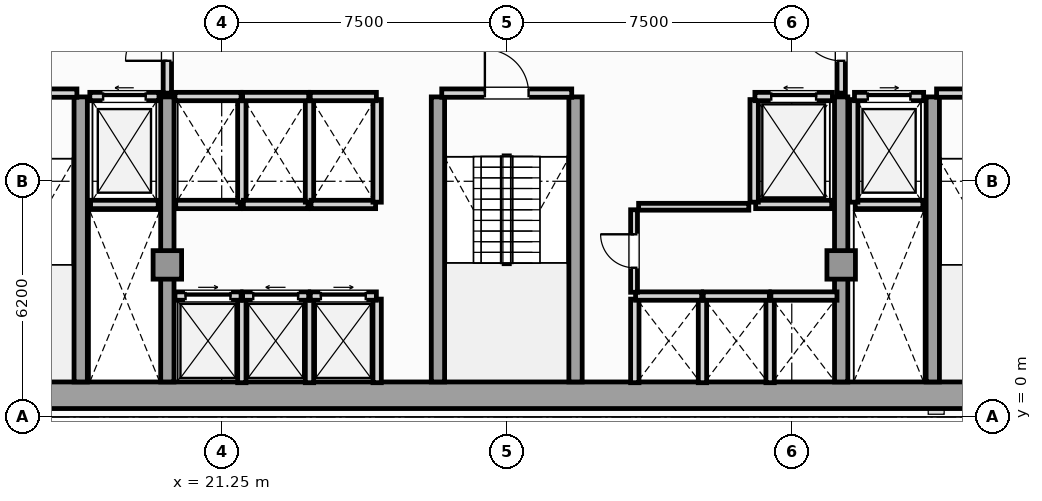
"""IFC4 building model, lengths in metres.
Left out: names, types, materials, properties, quantities, classifications, styles, units other than length and angle.
Written with IfcOpenShell. Run it as: python <this file> out.ifc"""

import sys

from ifc_helpers import new_model, si_unit, direction, frame, frame_2d, origin, origin_2d, place, context, subcontext, project, spatial, rectangle, extrude, element, fill, save


model = new_model("IFC4")
c1 = context("Model", 3, precision=1e-05, world=origin(), true_north=direction((0.0, 1.0)))
c2 = subcontext(c1, "Body", "Model", "MODEL_VIEW")
j1 = project(units=[si_unit("LENGTHUNIT", "METRE"), si_unit("PLANEANGLEUNIT", "RADIAN")], contexts=[c1])
p1 = place(None, origin())
s1 = spatial("IfcSite", under=j1, at=p1, CompositionType="ELEMENT")
p2 = place(p1, origin())
s2 = spatial("IfcBuilding", under=s1, at=p2, CompositionType="ELEMENT")
p3 = place(p2, frame((0.0, 0.0, 111.85)))
s3 = spatial("IfcBuildingStorey", under=s2, at=p3, CompositionType="ELEMENT", Elevation=111.85)
p4 = place(p3, frame((13.25, 0.57, 0.0), z_axis=(0.0, 0.0, 1.0), x_axis=(1.0, 0.0, 0.0)))
e1 = element("IfcWall", 1, at=p4, inside=s3, PredefinedType="SHEAR", context=c2, shape_type="SweptSolid", body=[
    extrude(rectangle(XDim=31.0, YDim=0.7, at=frame_2d((15.5, 0.0))), origin(), (0.0, 0.0, 1.0), 3.6),
])
for number, where, z_axis, x_axis in (
    (2, (17.54, 0.92, 0.0), (0.0, 0.0, 1.0), (0.0, 1.0, 0.0)),
    (3, (19.82, 0.92, 0.0), (0.0, 0.0, 1.0), (0.0, 1.0, 0.0)),
    (4, (26.94, 0.92, 0.0), (0.0, 0.0, 1.0), (0.0, 1.0, 0.0)),
    (5, (30.56, 0.92, 0.0), (0.0, 0.0, 1.0), (0.0, 1.0, 0.0)),
    (6, (37.55, 0.92, 0.0), (0.0, 0.0, 1.0), (0.0, 1.0, 0.0)),
    (7, (39.96, 0.92, 0.0), (0.0, 0.0, 1.0), (0.0, 1.0, 0.0)),
):
    element("IfcWall", number, at=place(p3, frame(where, z_axis=z_axis, x_axis=x_axis)), inside=s3, PredefinedType="SHEAR", context=c2, shape_type="SweptSolid", body=[
        extrude(rectangle(XDim=7.5, YDim=0.35, at=frame_2d((3.75, 0.0))), origin(), (0.0, 0.0, 1.0), 3.6),
    ])
for number, where, z_axis, x_axis in (
    (8, (19.82, 4.0, 0.0), (0.0, 0.0, 1.0), (1.0, 0.0, 0.0)),
    (9, (37.55, 4.0, 0.0), (0.0, 0.0, 1.0), (1.0, 0.0, 0.0)),
):
    element("IfcColumn", number, at=place(p3, frame(where, z_axis=z_axis, x_axis=x_axis)), inside=s3, PredefinedType="COLUMN", context=c2, shape_type="SweptSolid", body=[
        extrude(rectangle(XDim=0.75, YDim=0.75, at=origin_2d()), origin(), (0.0, 0.0, 1.0), 3.85),
    ])
p5 = place(p3, frame((17.8, 5.59, 0.0), z_axis=(0.0, 0.0, 1.0), x_axis=(1.0, 0.0, 0.0)))
e10 = element("IfcWall", 10, at=p5, inside=s3, PredefinedType="SOLIDWALL", context=c2, shape_type="SweptSolid", body=[
    extrude(rectangle(XDim=1.78, YDim=0.22, at=frame_2d((0.89, 0.0))), origin(), (0.0, 0.0, 1.0), 3.6),
])
p6 = place(p3, frame((17.78, 8.43, 0.0), z_axis=(0.0, 0.0, 1.0), x_axis=(1.0, 0.0, 0.0)))
e11 = element("IfcWall", 11, at=p6, inside=s3, PredefinedType="SOLIDWALL", context=c2, shape_type="SweptSolid", body=[
    extrude(rectangle(XDim=1.82, YDim=0.22, at=frame_2d((0.91, 0.0))), origin(), (0.0, 0.0, 1.0), 3.6),
])
p7 = place(p6, frame((0.35, 0.0, 0.0)))
e12 = element("IfcOpeningElement", 12, at=p7, cuts=e11, PredefinedType="OPENING", context=c2, shape_type="SweptSolid", body=[
    extrude(rectangle(XDim=1.12, YDim=2.25, at=frame_2d((0.56, 1.125))), frame((0.0, 0.12, 0.0), z_axis=(0.0, -1.0, 0.0), x_axis=(1.0, 0.0, 0.0)), (0.0, 0.0, 1.0), 0.24),
])
p8 = place(p3, frame((37.92, 5.59, 0.0), z_axis=(0.0, 0.0, 1.0), x_axis=(1.0, 0.0, 0.0)))
e13 = element("IfcWall", 13, at=p8, inside=s3, PredefinedType="SOLIDWALL", context=c2, shape_type="SweptSolid", body=[
    extrude(rectangle(XDim=1.78, YDim=0.22, at=frame_2d((0.89, 0.0))), origin(), (0.0, 0.0, 1.0), 3.6),
])
p9 = place(p3, frame((37.88, 5.65, 0.0), z_axis=(0.0, 0.0, 1.0), x_axis=(0.0, 1.0, 0.0)))
e14 = element("IfcWall", 14, at=p9, inside=s3, PredefinedType="SOLIDWALL", context=c2, shape_type="SweptSolid", body=[
    extrude(rectangle(XDim=2.7, YDim=0.22, at=frame_2d((1.35, 0.0))), origin(), (0.0, 0.0, 1.0), 3.6),
])
p10 = place(p3, frame((37.9, 8.43, 0.0), z_axis=(0.0, 0.0, 1.0), x_axis=(1.0, 0.0, 0.0)))
e15 = element("IfcWall", 15, at=p10, inside=s3, PredefinedType="SOLIDWALL", context=c2, shape_type="SweptSolid", body=[
    extrude(rectangle(XDim=1.82, YDim=0.22, at=frame_2d((0.91, 0.0))), origin(), (0.0, 0.0, 1.0), 3.6),
])
p11 = place(p10, frame((0.35, 0.0, 0.0)))
e16 = element("IfcOpeningElement", 16, at=p11, cuts=e15, PredefinedType="OPENING", context=c2, shape_type="SweptSolid", body=[
    extrude(rectangle(XDim=1.12, YDim=2.25, at=frame_2d((0.56, 1.125))), frame((0.0, 0.12, 0.0), z_axis=(0.0, -1.0, 0.0), x_axis=(1.0, 0.0, 0.0)), (0.0, 0.0, 1.0), 0.24),
])
p12 = place(p3, frame((35.3, 5.59, 0.0), z_axis=(0.0, 0.0, 1.0), x_axis=(1.0, 0.0, 0.0)))
e17 = element("IfcWall", 17, at=p12, inside=s3, PredefinedType="SOLIDWALL", context=c2, shape_type="SweptSolid", body=[
    extrude(rectangle(XDim=2.0, YDim=0.22, at=frame_2d((1.0, 0.0))), origin(), (0.0, 0.0, 1.0), 3.6),
])
p13 = place(p3, frame((35.26, 5.65, 0.0), z_axis=(0.0, 0.0, 1.0), x_axis=(0.0, 1.0, 0.0)))
e18 = element("IfcWall", 18, at=p13, inside=s3, PredefinedType="SOLIDWALL", context=c2, shape_type="SweptSolid", body=[
    extrude(rectangle(XDim=2.7, YDim=0.22, at=frame_2d((1.35, 0.0))), origin(), (0.0, 0.0, 1.0), 3.6),
])
p14 = place(p3, frame((35.28, 8.43, 0.0), z_axis=(0.0, 0.0, 1.0), x_axis=(1.0, 0.0, 0.0)))
e19 = element("IfcWall", 19, at=p14, inside=s3, PredefinedType="SOLIDWALL", context=c2, shape_type="SweptSolid", body=[
    extrude(rectangle(XDim=2.04, YDim=0.22, at=frame_2d((1.02, 0.0))), origin(), (0.0, 0.0, 1.0), 3.6),
])
p15 = place(p14, frame((0.43, 0.0, 0.0)))
e20 = element("IfcOpeningElement", 20, at=p15, cuts=e19, PredefinedType="OPENING", context=c2, shape_type="SweptSolid", body=[
    extrude(rectangle(XDim=1.18, YDim=2.2, at=frame_2d((0.59, 1.1))), frame((0.0, 0.12, 0.0), z_axis=(0.0, -1.0, 0.0), x_axis=(1.0, 0.0, 0.0)), (0.0, 0.0, 1.0), 0.24),
])
p16 = place(p3, frame((21.78, 0.9, 0.0), z_axis=(0.0, 0.0, 1.0), x_axis=(0.0, 1.0, 0.0)))
e21 = element("IfcWall", 21, at=p16, inside=s3, PredefinedType="SOLIDWALL", context=c2, shape_type="SweptSolid", body=[
    extrude(rectangle(XDim=2.2, YDim=0.22, at=frame_2d((1.1, 0.0))), origin(), (0.0, 0.0, 1.0), 3.6),
])
p17 = place(p3, frame((20.02, 3.18, 0.0), z_axis=(0.0, 0.0, 1.0), x_axis=(1.0, 0.0, 0.0)))
e22 = element("IfcWall", 22, at=p17, inside=s3, PredefinedType="SOLIDWALL", context=c2, shape_type="SweptSolid", body=[
    extrude(rectangle(XDim=1.74, YDim=0.22, at=frame_2d((0.87, 0.0))), origin(), (0.0, 0.0, 1.0), 3.6),
])
p18 = place(p17, frame((0.28, 0.0, 0.0)))
e23 = element("IfcOpeningElement", 23, at=p18, cuts=e22, PredefinedType="OPENING", context=c2, shape_type="SweptSolid", body=[
    extrude(rectangle(XDim=1.18, YDim=2.2, at=frame_2d((0.59, 1.1))), frame((0.0, 0.12, 0.0), z_axis=(0.0, -1.0, 0.0), x_axis=(1.0, 0.0, 0.0)), (0.0, 0.0, 1.0), 0.24),
])
p19 = place(p3, frame((23.56, 0.9, 0.0), z_axis=(0.0, 0.0, 1.0), x_axis=(0.0, 1.0, 0.0)))
e24 = element("IfcWall", 24, at=p19, inside=s3, PredefinedType="SOLIDWALL", context=c2, shape_type="SweptSolid", body=[
    extrude(rectangle(XDim=2.2, YDim=0.22, at=frame_2d((1.1, 0.0))), origin(), (0.0, 0.0, 1.0), 3.6),
])
p20 = place(p3, frame((21.8, 3.18, 0.0), z_axis=(0.0, 0.0, 1.0), x_axis=(1.0, 0.0, 0.0)))
e25 = element("IfcWall", 25, at=p20, inside=s3, PredefinedType="SOLIDWALL", context=c2, shape_type="SweptSolid", body=[
    extrude(rectangle(XDim=1.74, YDim=0.22, at=frame_2d((0.87, 0.0))), origin(), (0.0, 0.0, 1.0), 3.6),
])
p21 = place(p20, frame((0.28, 0.0, 0.0)))
e26 = element("IfcOpeningElement", 26, at=p21, cuts=e25, PredefinedType="OPENING", context=c2, shape_type="SweptSolid", body=[
    extrude(rectangle(XDim=1.18, YDim=2.2, at=frame_2d((0.59, 1.1))), frame((0.0, 0.12, 0.0), z_axis=(0.0, -1.0, 0.0), x_axis=(1.0, 0.0, 0.0)), (0.0, 0.0, 1.0), 0.24),
])
p22 = place(p3, frame((25.34, 0.9, 0.0), z_axis=(0.0, 0.0, 1.0), x_axis=(0.0, 1.0, 0.0)))
e27 = element("IfcWall", 27, at=p22, inside=s3, PredefinedType="SOLIDWALL", context=c2, shape_type="SweptSolid", body=[
    extrude(rectangle(XDim=2.2, YDim=0.22, at=frame_2d((1.1, 0.0))), origin(), (0.0, 0.0, 1.0), 3.6),
])
p23 = place(p3, frame((23.58, 3.18, 0.0), z_axis=(0.0, 0.0, 1.0), x_axis=(1.0, 0.0, 0.0)))
e28 = element("IfcWall", 28, at=p23, inside=s3, PredefinedType="SOLIDWALL", context=c2, shape_type="SweptSolid", body=[
    extrude(rectangle(XDim=1.74, YDim=0.22, at=frame_2d((0.87, 0.0))), origin(), (0.0, 0.0, 1.0), 3.6),
])
p24 = place(p23, frame((0.28, 0.0, 0.0)))
e29 = element("IfcOpeningElement", 29, at=p24, cuts=e28, PredefinedType="OPENING", context=c2, shape_type="SweptSolid", body=[
    extrude(rectangle(XDim=1.18, YDim=2.2, at=frame_2d((0.59, 1.1))), frame((0.0, 0.12, 0.0), z_axis=(0.0, -1.0, 0.0), x_axis=(1.0, 0.0, 0.0)), (0.0, 0.0, 1.0), 0.24),
])
for number, where, z_axis, x_axis in (
    (30, (32.12, 0.9, 0.0), (0.0, 0.0, 1.0), (0.0, 1.0, 0.0)),
    (31, (33.9, 0.9, 0.0), (0.0, 0.0, 1.0), (0.0, 1.0, 0.0)),
):
    element("IfcWall", number, at=place(p3, frame(where, z_axis=z_axis, x_axis=x_axis)), inside=s3, PredefinedType="SOLIDWALL", context=c2, shape_type="SweptSolid", body=[
        extrude(rectangle(XDim=2.2, YDim=0.22, at=frame_2d((1.1, 0.0))), origin(), (0.0, 0.0, 1.0), 3.6),
    ])
p25 = place(p3, frame((32.14, 3.18, 0.0), z_axis=(0.0, 0.0, 1.0), x_axis=(1.0, 0.0, 0.0)))
e32 = element("IfcWall", 32, at=p25, inside=s3, PredefinedType="SOLIDWALL", context=c2, shape_type="SweptSolid", body=[
    extrude(rectangle(XDim=1.74, YDim=0.22, at=frame_2d((0.87, 0.0))), origin(), (0.0, 0.0, 1.0), 3.6),
])
p26 = place(p3, frame((35.68, 0.9, 0.0), z_axis=(0.0, 0.0, 1.0), x_axis=(0.0, 1.0, 0.0)))
e33 = element("IfcWall", 33, at=p26, inside=s3, PredefinedType="SOLIDWALL", context=c2, shape_type="SweptSolid", body=[
    extrude(rectangle(XDim=2.2, YDim=0.22, at=frame_2d((1.1, 0.0))), origin(), (0.0, 0.0, 1.0), 3.6),
])
for number, where, z_axis, x_axis in (
    (34, (33.92, 3.18, 0.0), (0.0, 0.0, 1.0), (1.0, 0.0, 0.0)),
    (35, (35.7, 3.18, 0.0), (0.0, 0.0, 1.0), (1.0, 0.0, 0.0)),
):
    element("IfcWall", number, at=place(p3, frame(where, z_axis=z_axis, x_axis=x_axis)), inside=s3, PredefinedType="SOLIDWALL", context=c2, shape_type="SweptSolid", body=[
        extrude(rectangle(XDim=1.74, YDim=0.22, at=frame_2d((0.87, 0.0))), origin(), (0.0, 0.0, 1.0), 3.6),
    ])
p27 = place(p3, frame((20.04, 5.59, 0.0), z_axis=(0.0, 0.0, 1.0), x_axis=(1.0, 0.0, 0.0)))
e36 = element("IfcWall", 36, at=p27, inside=s3, PredefinedType="SOLIDWALL", context=c2, shape_type="SweptSolid", body=[
    extrude(rectangle(XDim=1.7, YDim=0.22, at=frame_2d((0.85, 0.0))), origin(), (0.0, 0.0, 1.0), 3.6),
])
p28 = place(p3, frame((21.78, 5.65, 0.0), z_axis=(0.0, 0.0, 1.0), x_axis=(0.0, 1.0, 0.0)))
e37 = element("IfcWall", 37, at=p28, inside=s3, PredefinedType="SOLIDWALL", context=c2, shape_type="SweptSolid", body=[
    extrude(rectangle(XDim=2.7, YDim=0.22, at=frame_2d((1.35, 0.0))), origin(), (0.0, 0.0, 1.0), 3.6),
])
p29 = place(p3, frame((20.02, 8.43, 0.0), z_axis=(0.0, 0.0, 1.0), x_axis=(1.0, 0.0, 0.0)))
e38 = element("IfcWall", 38, at=p29, inside=s3, PredefinedType="SOLIDWALL", context=c2, shape_type="SweptSolid", body=[
    extrude(rectangle(XDim=1.74, YDim=0.22, at=frame_2d((0.87, 0.0))), origin(), (0.0, 0.0, 1.0), 3.6),
])
p30 = place(p3, frame((21.82, 5.59, 0.0), z_axis=(0.0, 0.0, 1.0), x_axis=(1.0, 0.0, 0.0)))
e39 = element("IfcWall", 39, at=p30, inside=s3, PredefinedType="SOLIDWALL", context=c2, shape_type="SweptSolid", body=[
    extrude(rectangle(XDim=1.7, YDim=0.22, at=frame_2d((0.85, 0.0))), origin(), (0.0, 0.0, 1.0), 3.6),
])
p31 = place(p3, frame((23.56, 5.65, 0.0), z_axis=(0.0, 0.0, 1.0), x_axis=(0.0, 1.0, 0.0)))
e40 = element("IfcWall", 40, at=p31, inside=s3, PredefinedType="SOLIDWALL", context=c2, shape_type="SweptSolid", body=[
    extrude(rectangle(XDim=2.7, YDim=0.22, at=frame_2d((1.35, 0.0))), origin(), (0.0, 0.0, 1.0), 3.6),
])
p32 = place(p3, frame((21.8, 8.43, 0.0), z_axis=(0.0, 0.0, 1.0), x_axis=(1.0, 0.0, 0.0)))
e41 = element("IfcWall", 41, at=p32, inside=s3, PredefinedType="SOLIDWALL", context=c2, shape_type="SweptSolid", body=[
    extrude(rectangle(XDim=1.74, YDim=0.22, at=frame_2d((0.87, 0.0))), origin(), (0.0, 0.0, 1.0), 3.6),
])
p33 = place(p3, frame((23.6, 5.59, 0.0), z_axis=(0.0, 0.0, 1.0), x_axis=(1.0, 0.0, 0.0)))
e42 = element("IfcWall", 42, at=p33, inside=s3, PredefinedType="SOLIDWALL", context=c2, shape_type="SweptSolid", body=[
    extrude(rectangle(XDim=1.7, YDim=0.22, at=frame_2d((0.85, 0.0))), origin(), (0.0, 0.0, 1.0), 3.6),
])
p34 = place(p3, frame((25.34, 5.65, 0.0), z_axis=(0.0, 0.0, 1.0), x_axis=(0.0, 1.0, 0.0)))
e43 = element("IfcWall", 43, at=p34, inside=s3, PredefinedType="SOLIDWALL", context=c2, shape_type="SweptSolid", body=[
    extrude(rectangle(XDim=2.7, YDim=0.22, at=frame_2d((1.35, 0.0))), origin(), (0.0, 0.0, 1.0), 3.6),
])
p35 = place(p3, frame((23.58, 8.43, 0.0), z_axis=(0.0, 0.0, 1.0), x_axis=(1.0, 0.0, 0.0)))
e44 = element("IfcWall", 44, at=p35, inside=s3, PredefinedType="SOLIDWALL", context=c2, shape_type="SweptSolid", body=[
    extrude(rectangle(XDim=1.74, YDim=0.22, at=frame_2d((0.87, 0.0))), origin(), (0.0, 0.0, 1.0), 3.6),
])
p36 = place(p3, frame((14.04, 8.52, 0.0), z_axis=(0.0, 0.0, 1.0), x_axis=(1.0, 0.0, 0.0)))
e45 = element("IfcWall", 45, at=p36, inside=s3, PredefinedType="SOLIDWALL", context=c2, shape_type="SweptSolid", body=[
    extrude(rectangle(XDim=3.4, YDim=0.22, at=frame_2d((1.7, 0.0))), origin(), (0.0, 0.0, 1.0), 3.6),
])
p37 = place(p36, frame((1.125, 0.0, 0.0)))
e46 = element("IfcOpeningElement", 46, at=p37, cuts=e45, PredefinedType="OPENING", context=c2, shape_type="SweptSolid", body=[
    extrude(rectangle(XDim=1.15, YDim=2.2, at=frame_2d((0.575, 1.1))), frame((0.0, 0.12, 0.0), z_axis=(0.0, -1.0, 0.0), x_axis=(1.0, 0.0, 0.0)), (0.0, 0.0, 1.0), 0.24),
])
p38 = place(p3, frame((40.06, 8.52, 0.0), z_axis=(0.0, 0.0, 1.0), x_axis=(1.0, 0.0, 0.0)))
e47 = element("IfcWall", 47, at=p38, inside=s3, PredefinedType="SOLIDWALL", context=c2, shape_type="SweptSolid", body=[
    extrude(rectangle(XDim=3.4, YDim=0.22, at=frame_2d((1.7, 0.0))), origin(), (0.0, 0.0, 1.0), 3.6),
])
p39 = place(p38, frame((1.125, 0.0, 0.0)))
e48 = element("IfcOpeningElement", 48, at=p39, cuts=e47, PredefinedType="OPENING", context=c2, shape_type="SweptSolid", body=[
    extrude(rectangle(XDim=1.15, YDim=2.2, at=frame_2d((0.575, 1.1))), frame((0.0, 0.12, 0.0), z_axis=(0.0, -1.0, 0.0), x_axis=(1.0, 0.0, 0.0)), (0.0, 0.0, 1.0), 0.24),
])
p40 = place(p3, frame((27.04, 8.52, 0.0), z_axis=(0.0, 0.0, 1.0), x_axis=(1.0, 0.0, 0.0)))
e49 = element("IfcWall", 49, at=p40, inside=s3, PredefinedType="SOLIDWALL", context=c2, shape_type="SweptSolid", body=[
    extrude(rectangle(XDim=3.42, YDim=0.22, at=frame_2d((1.71, 0.0))), origin(), (0.0, 0.0, 1.0), 3.6),
])
p41 = place(p40, frame((1.135, 0.0, 0.0)))
e50 = element("IfcOpeningElement", 50, at=p41, cuts=e49, PredefinedType="OPENING", context=c2, shape_type="SweptSolid", body=[
    extrude(rectangle(XDim=1.15, YDim=2.2, at=frame_2d((0.575, 1.1))), frame((0.0, 0.12, 0.0), z_axis=(0.0, -1.0, 0.0), x_axis=(1.0, 0.0, 0.0)), (0.0, 0.0, 1.0), 0.24),
])
p42 = place(p3, frame((19.82, 8.52, 0.0), z_axis=(0.0, 0.0, 1.0), x_axis=(0.0, 1.0, 0.0)))
e51 = element("IfcWall", 51, at=p42, inside=s3, PredefinedType="SOLIDWALL", context=c2, shape_type="SweptSolid", body=[
    extrude(rectangle(XDim=2.8, YDim=0.22, at=frame_2d((1.4, 0.0))), origin(), (0.0, 0.0, 1.0), 3.055),
])
p43 = place(p42, frame((0.85, 0.0, 0.0)))
e52 = element("IfcOpeningElement", 52, at=p43, cuts=e51, PredefinedType="OPENING", context=c2, shape_type="SweptSolid", body=[
    extrude(rectangle(XDim=1.1, YDim=2.2, at=frame_2d((0.55, 1.1))), frame((0.0, 0.12, 0.0), z_axis=(0.0, -1.0, 0.0), x_axis=(1.0, 0.0, 0.0)), (0.0, 0.0, 1.0), 0.24),
])
p44 = place(p3, frame((37.55, 8.52, 0.0), z_axis=(0.0, 0.0, 1.0), x_axis=(0.0, 1.0, 0.0)))
e53 = element("IfcWall", 53, at=p44, inside=s3, PredefinedType="SOLIDWALL", context=c2, shape_type="SweptSolid", body=[
    extrude(rectangle(XDim=2.8, YDim=0.22, at=frame_2d((1.4, 0.0))), origin(), (0.0, 0.0, 1.0), 3.055),
])
p45 = place(p44, frame((0.85, 0.0, 0.0)))
e54 = element("IfcOpeningElement", 54, at=p45, cuts=e53, PredefinedType="OPENING", context=c2, shape_type="SweptSolid", body=[
    extrude(rectangle(XDim=1.1, YDim=2.2, at=frame_2d((0.55, 1.1))), frame((0.0, 0.12, 0.0), z_axis=(0.0, -1.0, 0.0), x_axis=(1.0, 0.0, 0.0)), (0.0, 0.0, 1.0), 0.24),
])
p46 = place(p3, frame((32.1, 3.28, 0.0), z_axis=(0.0, 0.0, 1.0), x_axis=(0.0, 1.0, 0.0)))
e55 = element("IfcWall", 55, at=p46, inside=s3, PredefinedType="PARTITIONING", context=c2, shape_type="SweptSolid", body=[
    extrude(rectangle(XDim=2.17, YDim=0.18, at=frame_2d((1.085, 0.0))), origin(), (0.0, 0.0, 1.0), 3.6),
])
p47 = place(p46, frame((0.645, 0.0, 0.0)))
e56 = element("IfcOpeningElement", 56, at=p47, cuts=e55, PredefinedType="OPENING", context=c2, shape_type="SweptSolid", body=[
    extrude(rectangle(XDim=0.88, YDim=2.05, at=frame_2d((0.44, 1.025))), frame((0.0, 0.1, 0.0), z_axis=(0.0, -1.0, 0.0), x_axis=(1.0, 0.0, 0.0)), (0.0, 0.0, 1.0), 0.2),
])
p48 = place(p3, frame((32.22, 5.53, 0.0), z_axis=(0.0, 0.0, 1.0), x_axis=(1.0, 0.0, 0.0)))
e57 = element("IfcWall", 57, at=p48, inside=s3, PredefinedType="PARTITIONING", context=c2, shape_type="SweptSolid", body=[
    extrude(rectangle(XDim=2.9, YDim=0.18, at=frame_2d((1.45, 0.0))), origin(), (0.0, 0.0, 1.0), 3.6),
])
p49 = place(p7, origin())
e58 = element("IfcDoor", 58, at=p49, inside=s3, OperationType="SLIDING_TO_LEFT", PredefinedType="DOOR", context=c2, shape_type="SweptSolid", body=[
    extrude(rectangle(XDim=1.12, YDim=2.25, at=frame_2d((0.56, 1.125))), frame((0.0, 0.025, 0.0), z_axis=(0.0, -1.0, 0.0), x_axis=(1.0, 0.0, 0.0)), (0.0, 0.0, 1.0), 0.05),
])
fill(e12, e58)
p50 = place(p11, origin())
e59 = element("IfcDoor", 59, at=p50, inside=s3, OperationType="SLIDING_TO_RIGHT", PredefinedType="DOOR", context=c2, shape_type="SweptSolid", body=[
    extrude(rectangle(XDim=1.12, YDim=2.25, at=frame_2d((0.56, 1.125))), frame((0.0, 0.025, 0.0), z_axis=(0.0, -1.0, 0.0), x_axis=(1.0, 0.0, 0.0)), (0.0, 0.0, 1.0), 0.05),
])
fill(e16, e59)
p51 = place(p15, origin())
e60 = element("IfcDoor", 60, at=p51, inside=s3, OperationType="SLIDING_TO_LEFT", PredefinedType="DOOR", context=c2, shape_type="SweptSolid", body=[
    extrude(rectangle(XDim=1.18, YDim=2.2, at=frame_2d((0.59, 1.1))), frame((0.0, 0.025, 0.0), z_axis=(0.0, -1.0, 0.0), x_axis=(1.0, 0.0, 0.0)), (0.0, 0.0, 1.0), 0.05),
])
fill(e20, e60)
p52 = place(p18, origin())
e61 = element("IfcDoor", 61, at=p52, inside=s3, OperationType="SLIDING_TO_RIGHT", PredefinedType="DOOR", context=c2, shape_type="SweptSolid", body=[
    extrude(rectangle(XDim=1.18, YDim=2.2, at=frame_2d((0.59, 1.1))), frame((0.0, 0.025, 0.0), z_axis=(0.0, -1.0, 0.0), x_axis=(1.0, 0.0, 0.0)), (0.0, 0.0, 1.0), 0.05),
])
fill(e23, e61)
p53 = place(p21, origin())
e62 = element("IfcDoor", 62, at=p53, inside=s3, OperationType="SLIDING_TO_LEFT", PredefinedType="DOOR", context=c2, shape_type="SweptSolid", body=[
    extrude(rectangle(XDim=1.18, YDim=2.2, at=frame_2d((0.59, 1.1))), frame((0.0, 0.025, 0.0), z_axis=(0.0, -1.0, 0.0), x_axis=(1.0, 0.0, 0.0)), (0.0, 0.0, 1.0), 0.05),
])
fill(e26, e62)
p54 = place(p24, origin())
e63 = element("IfcDoor", 63, at=p54, inside=s3, OperationType="SLIDING_TO_RIGHT", PredefinedType="DOOR", context=c2, shape_type="SweptSolid", body=[
    extrude(rectangle(XDim=1.18, YDim=2.2, at=frame_2d((0.59, 1.1))), frame((0.0, 0.025, 0.0), z_axis=(0.0, -1.0, 0.0), x_axis=(1.0, 0.0, 0.0)), (0.0, 0.0, 1.0), 0.05),
])
fill(e29, e63)
p55 = place(p41, origin())
e64 = element("IfcDoor", 64, at=p55, inside=s3, OperationType="SINGLE_SWING_LEFT", PredefinedType="DOOR", context=c2, shape_type="SweptSolid", body=[
    extrude(rectangle(XDim=1.15, YDim=2.2, at=frame_2d((0.575, 1.1))), frame((0.0, 0.025, 0.0), z_axis=(0.0, -1.0, 0.0), x_axis=(1.0, 0.0, 0.0)), (0.0, 0.0, 1.0), 0.05),
])
fill(e50, e64)
p56 = place(p43, origin())
e65 = element("IfcDoor", 65, at=p56, inside=s3, OperationType="SINGLE_SWING_LEFT", PredefinedType="DOOR", context=c2, shape_type="SweptSolid", body=[
    extrude(rectangle(XDim=1.1, YDim=2.2, at=frame_2d((0.55, 1.1))), frame((0.0, 0.025, 0.0), z_axis=(0.0, -1.0, 0.0), x_axis=(1.0, 0.0, 0.0)), (0.0, 0.0, 1.0), 0.05),
])
fill(e52, e65)
p57 = place(p45, origin())
e66 = element("IfcDoor", 66, at=p57, inside=s3, OperationType="SINGLE_SWING_RIGHT", PredefinedType="DOOR", context=c2, shape_type="SweptSolid", body=[
    extrude(rectangle(XDim=1.1, YDim=2.2, at=frame_2d((0.55, 1.1))), frame((0.0, 0.025, 0.0), z_axis=(0.0, -1.0, 0.0), x_axis=(1.0, 0.0, 0.0)), (0.0, 0.0, 1.0), 0.05),
])
fill(e54, e66)
p58 = place(p47, origin())
e67 = element("IfcDoor", 67, at=p58, inside=s3, OperationType="SINGLE_SWING_RIGHT", PredefinedType="DOOR", context=c2, shape_type="SweptSolid", body=[
    extrude(rectangle(XDim=0.88, YDim=2.05, at=frame_2d((0.44, 1.025))), frame((0.0, 0.025, 0.0), z_axis=(0.0, -1.0, 0.0), x_axis=(1.0, 0.0, 0.0)), (0.0, 0.0, 1.0), 0.05),
])
fill(e56, e67)
save(model, sys.argv[1])
